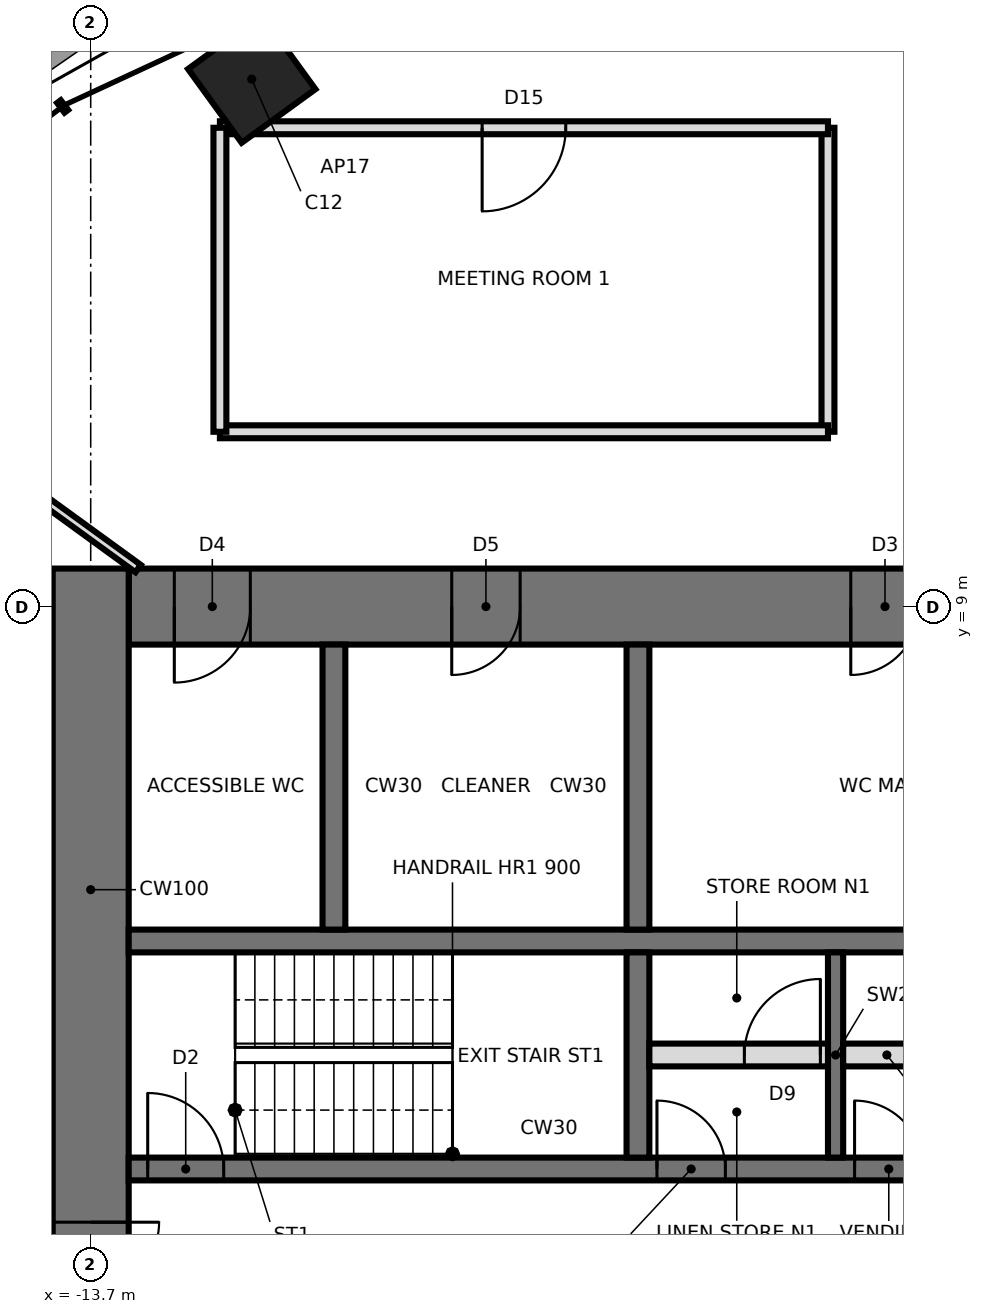
"""IFC4 building model, lengths in metres.
Left out: names, types, materials, properties, quantities, classifications, styles, units other than length and angle.
Written with IfcOpenShell. Run it as: python <this file> out.ifc"""

import sys

from ifc_helpers import new_model, si_unit, direction, frame, frame_2d, origin, origin_2d, place, context, subcontext, project, spatial, rectangle, extrude, element, fill, save


model = new_model("IFC4")
c1 = context("Model", 3, precision=1e-05, world=origin(), true_north=direction((0.0, 1.0)))
c2 = subcontext(c1, "Body", "Model", "MODEL_VIEW")
j1 = project(units=[si_unit("LENGTHUNIT", "METRE"), si_unit("PLANEANGLEUNIT", "RADIAN")], contexts=[c1])
p1 = place(None, origin())
s1 = spatial("IfcSite", under=j1, at=p1, CompositionType="ELEMENT")
p2 = place(p1, origin())
s2 = spatial("IfcBuilding", under=s1, at=p2, CompositionType="ELEMENT")
p3 = place(p2, frame((0.0, 0.0, 268.6)))
s3 = spatial("IfcBuildingStorey", under=s2, at=p3, CompositionType="ELEMENT", Elevation=268.6)
p4 = place(p3, frame((-11.581, 15.94, 0.0), z_axis=(0.0, 0.0, 1.0), x_axis=(-0.587785252292, 0.809016994375, 0.0)))
e1 = element("IfcColumn", 1, at=p4, inside=s3, PredefinedType="COLUMN", context=c2, shape_type="SweptSolid", body=[
    extrude(rectangle(XDim=1.2, YDim=1.2, at=origin_2d()), origin(), (0.0, 0.0, 1.0), 4.2),
])
p5 = place(p3, frame((13.2, 9.0, 0.0), z_axis=(0.0, 0.0, 1.0), x_axis=(-1.0, 0.0, 0.0)))
e2 = element("IfcWall", 2, at=p5, inside=s3, PredefinedType="SHEAR", context=c2, shape_type="SweptSolid", body=[
    extrude(rectangle(XDim=26.4, YDim=1.0, at=frame_2d((13.2, 0.0))), origin(), (0.0, 0.0, 1.0), 4.2),
])
p6 = place(p5, frame((2.65, 0.0, 0.0)))
e3 = element("IfcOpeningElement", 3, at=p6, cuts=e2, PredefinedType="OPENING", context=c2, shape_type="SweptSolid", body=[
    extrude(rectangle(XDim=0.9, YDim=2.1, at=frame_2d((0.45, 1.05))), frame((0.0, 0.51, 0.0), z_axis=(0.0, -1.0, 0.0), x_axis=(1.0, 0.0, 0.0)), (0.0, 0.0, 1.0), 1.02),
])
p7 = place(p5, frame((9.5, 0.0, 0.0)))
e4 = element("IfcOpeningElement", 4, at=p7, cuts=e2, PredefinedType="OPENING", context=c2, shape_type="SweptSolid", body=[
    extrude(rectangle(XDim=0.9, YDim=2.1, at=frame_2d((0.45, 1.05))), frame((0.0, 0.51, 0.0), z_axis=(0.0, -1.0, 0.0), x_axis=(1.0, 0.0, 0.0)), (0.0, 0.0, 1.0), 1.02),
])
p8 = place(p5, frame((16.0, 0.0, 0.0)))
e5 = element("IfcOpeningElement", 5, at=p8, cuts=e2, PredefinedType="OPENING", context=c2, shape_type="SweptSolid", body=[
    extrude(rectangle(XDim=0.9, YDim=2.1, at=frame_2d((0.45, 1.05))), frame((0.0, 0.51, 0.0), z_axis=(0.0, -1.0, 0.0), x_axis=(1.0, 0.0, 0.0)), (0.0, 0.0, 1.0), 1.02),
])
p9 = place(p5, frame((21.25, 0.0, 0.0)))
e6 = element("IfcOpeningElement", 6, at=p9, cuts=e2, PredefinedType="OPENING", context=c2, shape_type="SweptSolid", body=[
    extrude(rectangle(XDim=0.9, YDim=2.1, at=frame_2d((0.45, 1.05))), frame((0.0, 0.51, 0.0), z_axis=(0.0, -1.0, 0.0), x_axis=(1.0, 0.0, 0.0)), (0.0, 0.0, 1.0), 1.02),
])
p10 = place(p5, frame((24.8, 0.0, 0.0)))
e7 = element("IfcOpeningElement", 7, at=p10, cuts=e2, PredefinedType="OPENING", context=c2, shape_type="SweptSolid", body=[
    extrude(rectangle(XDim=1.0, YDim=2.1, at=frame_2d((0.5, 1.05))), frame((0.0, 0.51, 0.0), z_axis=(0.0, -1.0, 0.0), x_axis=(1.0, 0.0, 0.0)), (0.0, 0.0, 1.0), 1.02),
])
p11 = place(p3, frame((-13.7, 9.5, 0.0), z_axis=(0.0, 0.0, 1.0), x_axis=(0.0, -1.0, 0.0)))
e8 = element("IfcWall", 8, at=p11, inside=s3, PredefinedType="SHEAR", context=c2, shape_type="SweptSolid", body=[
    extrude(rectangle(XDim=19.0, YDim=1.0, at=frame_2d((9.5, 0.0))), origin(), (0.0, 0.0, 1.0), 4.2),
])
p12 = place(p11, frame((8.6, 0.0, 0.0)))
e9 = element("IfcOpeningElement", 9, at=p12, cuts=e8, PredefinedType="OPENING", context=c2, shape_type="SweptSolid", body=[
    extrude(rectangle(XDim=1.8, YDim=2.4, at=frame_2d((0.9, 1.2))), frame((0.0, 0.51, 0.0), z_axis=(0.0, -1.0, 0.0), x_axis=(1.0, 0.0, 0.0)), (0.0, 0.0, 1.0), 1.02),
])
p13 = place(p3, frame((-13.2, 1.6, 0.0), z_axis=(0.0, 0.0, 1.0), x_axis=(1.0, 0.0, 0.0)))
e10 = element("IfcWall", 10, at=p13, inside=s3, PredefinedType="SHEAR", context=c2, shape_type="SweptSolid", body=[
    extrude(rectangle(XDim=26.4, YDim=0.3, at=frame_2d((13.2, 0.0))), origin(), (0.0, 0.0, 1.0), 4.2),
])
p14 = place(p13, frame((0.25, 0.0, 0.0)))
e11 = element("IfcOpeningElement", 11, at=p14, cuts=e10, PredefinedType="OPENING", context=c2, shape_type="SweptSolid", body=[
    extrude(rectangle(XDim=1.0, YDim=2.1, at=frame_2d((0.5, 1.05))), frame((0.0, 0.16, 0.0), z_axis=(0.0, -1.0, 0.0), x_axis=(1.0, 0.0, 0.0)), (0.0, 0.0, 1.0), 0.32),
])
p15 = place(p13, frame((20.25, 0.0, 0.0)))
e12 = element("IfcOpeningElement", 12, at=p15, cuts=e10, PredefinedType="OPENING", context=c2, shape_type="SweptSolid", body=[
    extrude(rectangle(XDim=1.5, YDim=2.4, at=frame_2d((0.75, 1.2))), frame((0.0, 0.16, 0.0), z_axis=(0.0, -1.0, 0.0), x_axis=(1.0, 0.0, 0.0)), (0.0, 0.0, 1.0), 0.32),
])
p16 = place(p13, frame((6.95, 0.0, 0.0)))
e13 = element("IfcOpeningElement", 13, at=p16, cuts=e10, PredefinedType="OPENING", context=c2, shape_type="SweptSolid", body=[
    extrude(rectangle(XDim=0.9, YDim=2.1, at=frame_2d((0.45, 1.05))), frame((0.0, 0.16, 0.0), z_axis=(0.0, -1.0, 0.0), x_axis=(1.0, 0.0, 0.0)), (0.0, 0.0, 1.0), 0.32),
])
p17 = place(p13, frame((9.55, 0.0, 0.0)))
e14 = element("IfcOpeningElement", 14, at=p17, cuts=e10, PredefinedType="OPENING", context=c2, shape_type="SweptSolid", body=[
    extrude(rectangle(XDim=0.9, YDim=2.1, at=frame_2d((0.45, 1.05))), frame((0.0, 0.16, 0.0), z_axis=(0.0, -1.0, 0.0), x_axis=(1.0, 0.0, 0.0)), (0.0, 0.0, 1.0), 0.32),
])
p18 = place(p13, frame((12.15, 0.0, 0.0)))
e15 = element("IfcOpeningElement", 15, at=p18, cuts=e10, PredefinedType="OPENING", context=c2, shape_type="SweptSolid", body=[
    extrude(rectangle(XDim=0.9, YDim=2.1, at=frame_2d((0.45, 1.05))), frame((0.0, 0.16, 0.0), z_axis=(0.0, -1.0, 0.0), x_axis=(1.0, 0.0, 0.0)), (0.0, 0.0, 1.0), 0.32),
])
p19 = place(p13, frame((15.25, 0.0, 0.0)))
e16 = element("IfcOpeningElement", 16, at=p19, cuts=e10, PredefinedType="OPENING", context=c2, shape_type="SweptSolid", body=[
    extrude(rectangle(XDim=1.1, YDim=2.3, at=frame_2d((0.55, 1.15))), frame((0.0, 0.16, 0.0), z_axis=(0.0, -1.0, 0.0), x_axis=(1.0, 0.0, 0.0)), (0.0, 0.0, 1.0), 0.32),
])
p20 = place(p13, frame((17.85, 0.0, 0.0)))
e17 = element("IfcOpeningElement", 17, at=p20, cuts=e10, PredefinedType="OPENING", context=c2, shape_type="SweptSolid", body=[
    extrude(rectangle(XDim=1.1, YDim=2.3, at=frame_2d((0.55, 1.15))), frame((0.0, 0.16, 0.0), z_axis=(0.0, -1.0, 0.0), x_axis=(1.0, 0.0, 0.0)), (0.0, 0.0, 1.0), 0.32),
])
p21 = place(p13, frame((24.15, 0.0, 0.0)))
e18 = element("IfcOpeningElement", 18, at=p21, cuts=e10, PredefinedType="OPENING", context=c2, shape_type="SweptSolid", body=[
    extrude(rectangle(XDim=0.9, YDim=2.1, at=frame_2d((0.45, 1.05))), frame((0.0, 0.16, 0.0), z_axis=(0.0, -1.0, 0.0), x_axis=(1.0, 0.0, 0.0)), (0.0, 0.0, 1.0), 0.32),
])
p22 = place(p3, frame((-13.2, 4.6, 0.0), z_axis=(0.0, 0.0, 1.0), x_axis=(1.0, 0.0, 0.0)))
e19 = element("IfcWall", 19, at=p22, inside=s3, PredefinedType="SHEAR", context=c2, shape_type="SweptSolid", body=[
    extrude(rectangle(XDim=26.4, YDim=0.3, at=frame_2d((13.2, 0.0))), origin(), (0.0, 0.0, 1.0), 4.2),
])
p23 = place(p3, frame((-6.5, 1.75, 0.0), z_axis=(0.0, 0.0, 1.0), x_axis=(0.0, 1.0, 0.0)))
e20 = element("IfcWall", 20, at=p23, inside=s3, PredefinedType="SHEAR", context=c2, shape_type="SweptSolid", body=[
    extrude(rectangle(XDim=2.7, YDim=0.3, at=frame_2d((1.35, 0.0))), origin(), (0.0, 0.0, 1.0), 4.2),
])
p24 = place(p3, frame((-6.5, 4.75, 0.0), z_axis=(0.0, 0.0, 1.0), x_axis=(0.0, 1.0, 0.0)))
e21 = element("IfcWall", 21, at=p24, inside=s3, PredefinedType="SHEAR", context=c2, shape_type="SweptSolid", body=[
    extrude(rectangle(XDim=3.75, YDim=0.3, at=frame_2d((1.875, 0.0))), origin(), (0.0, 0.0, 1.0), 4.2),
])
p25 = place(p3, frame((-3.9, 1.75, 0.0), z_axis=(0.0, 0.0, 1.0), x_axis=(0.0, 1.0, 0.0)))
e22 = element("IfcWall", 22, at=p25, inside=s3, PredefinedType="SHEAR", context=c2, shape_type="SweptSolid", body=[
    extrude(rectangle(XDim=2.7, YDim=0.2, at=frame_2d((1.35, 0.0))), origin(), (0.0, 0.0, 1.0), 4.2),
])
p26 = place(p3, frame((-10.5, 4.75, 0.0), z_axis=(0.0, 0.0, 1.0), x_axis=(0.0, 1.0, 0.0)))
e23 = element("IfcWall", 23, at=p26, inside=s3, PredefinedType="SHEAR", context=c2, shape_type="SweptSolid", body=[
    extrude(rectangle(XDim=3.75, YDim=0.3, at=frame_2d((1.875, 0.0))), origin(), (0.0, 0.0, 1.0), 4.2),
])
p27 = place(p3, frame((-6.35, 3.1, 0.0), z_axis=(0.0, 0.0, 1.0), x_axis=(1.0, 0.0, 0.0)))
e24 = element("IfcWall", 24, at=p27, inside=s3, PredefinedType="PARTITIONING", context=c2, shape_type="SweptSolid", body=[
    extrude(rectangle(XDim=2.35, YDim=0.3, at=frame_2d((1.175, 0.0))), origin(), (0.0, 0.0, 1.0), 4.04),
])
p28 = place(p27, frame((1.25, 0.0, 0.0)))
e25 = element("IfcOpeningElement", 25, at=p28, cuts=e24, PredefinedType="OPENING", context=c2, shape_type="SweptSolid", body=[
    extrude(rectangle(XDim=1.0, YDim=2.4, at=frame_2d((0.5, 1.2))), frame((0.0, 0.16, 0.0), z_axis=(0.0, -1.0, 0.0), x_axis=(1.0, 0.0, 0.0)), (0.0, 0.0, 1.0), 0.32),
])
p29 = place(p3, frame((-3.8, 3.1, 0.0), z_axis=(0.0, 0.0, 1.0), x_axis=(1.0, 0.0, 0.0)))
e26 = element("IfcWall", 26, at=p29, inside=s3, PredefinedType="PARTITIONING", context=c2, shape_type="SweptSolid", body=[
    extrude(rectangle(XDim=2.4, YDim=0.3, at=frame_2d((1.2, 0.0))), origin(), (0.0, 0.0, 1.0), 4.04),
])
p30 = place(p29, frame((1.3, 0.0, 0.0)))
e27 = element("IfcOpeningElement", 27, at=p30, cuts=e26, PredefinedType="OPENING", context=c2, shape_type="SweptSolid", body=[
    extrude(rectangle(XDim=1.0, YDim=2.4, at=frame_2d((0.5, 1.2))), frame((0.0, 0.16, 0.0), z_axis=(0.0, -1.0, 0.0), x_axis=(1.0, 0.0, 0.0)), (0.0, 0.0, 1.0), 0.32),
])
p31 = place(p3, frame((-4.0, 15.3, 0.0), z_axis=(0.0, 0.0, 1.0), x_axis=(0.0, -1.0, 0.0)))
e28 = element("IfcWall", 28, at=p31, inside=s3, PredefinedType="PARTITIONING", context=c2, shape_type="SweptSolid", body=[
    extrude(rectangle(XDim=4.0, YDim=0.17, at=frame_2d((2.0, 0.0))), origin(), (0.0, 0.0, 1.0), 4.04),
])
p32 = place(p3, frame((-12.0, 15.3, 0.0), z_axis=(0.0, 0.0, 1.0), x_axis=(1.0, 0.0, 0.0)))
e29 = element("IfcWall", 29, at=p32, inside=s3, PredefinedType="PARTITIONING", context=c2, shape_type="SweptSolid", body=[
    extrude(rectangle(XDim=8.0, YDim=0.17, at=frame_2d((4.0, 0.0))), origin(), (0.0, 0.0, 1.0), 4.04),
])
p33 = place(p32, frame((3.45, 0.0, 0.0)))
e30 = element("IfcOpeningElement", 30, at=p33, cuts=e29, PredefinedType="OPENING", context=c2, shape_type="SweptSolid", body=[
    extrude(rectangle(XDim=1.1, YDim=2.4, at=frame_2d((0.55, 1.2))), frame((0.0, 0.095, 0.0), z_axis=(0.0, -1.0, 0.0), x_axis=(1.0, 0.0, 0.0)), (0.0, 0.0, 1.0), 0.19),
])
p34 = place(p3, frame((-4.0, 11.3, 0.0), z_axis=(0.0, 0.0, 1.0), x_axis=(-1.0, 0.0, 0.0)))
e31 = element("IfcWall", 31, at=p34, inside=s3, PredefinedType="PARTITIONING", context=c2, shape_type="SweptSolid", body=[
    extrude(rectangle(XDim=8.0, YDim=0.17, at=frame_2d((4.0, 0.0))), origin(), (0.0, 0.0, 1.0), 4.04),
])
p35 = place(p3, frame((-12.0, 11.3, 0.0), z_axis=(0.0, 0.0, 1.0), x_axis=(0.0, 1.0, 0.0)))
e32 = element("IfcWall", 32, at=p35, inside=s3, PredefinedType="PARTITIONING", context=c2, shape_type="SweptSolid", body=[
    extrude(rectangle(XDim=4.0, YDim=0.17, at=frame_2d((2.0, 0.0))), origin(), (0.0, 0.0, 1.0), 4.04),
])
p36 = place(p3, frame((-13.076, 9.5, 0.0), z_axis=(0.0, 0.0, 1.0), x_axis=(-0.809011091578, 0.58779337671, 0.0)))
e33 = element("IfcWall", 33, at=p36, inside=s3, PredefinedType="PARTITIONING", context=c2, shape_type="SweptSolid", body=[
    extrude(rectangle(XDim=5.603, YDim=0.12, at=frame_2d((2.802, 0.0))), origin(), (0.0, 0.0, 1.0), 3.24),
])
p37 = place(p12, origin())
e34 = element("IfcDoor", 34, at=p37, inside=s3, OperationType="DOUBLE_DOOR_SINGLE_SWING", PredefinedType="DOOR", context=c2, shape_type="SweptSolid", body=[
    extrude(rectangle(XDim=1.72, YDim=2.36, at=frame_2d((0.9, 1.18))), frame((0.0, 0.025, 0.0), z_axis=(0.0, -1.0, 0.0), x_axis=(1.0, 0.0, 0.0)), (0.0, 0.0, 1.0), 0.05),
    extrude(rectangle(XDim=0.04, YDim=2.4, at=frame_2d((0.02, 1.2))), frame((0.0, 0.25, 0.0), z_axis=(0.0, -1.0, 0.0), x_axis=(1.0, 0.0, 0.0)), (0.0, 0.0, 1.0), 0.5),
    extrude(rectangle(XDim=0.04, YDim=2.4, at=frame_2d((1.78, 1.2))), frame((0.0, 0.25, 0.0), z_axis=(0.0, -1.0, 0.0), x_axis=(1.0, 0.0, 0.0)), (0.0, 0.0, 1.0), 0.5),
    extrude(rectangle(XDim=1.72, YDim=0.04, at=frame_2d((0.9, 2.38))), frame((0.0, 0.25, 0.0), z_axis=(0.0, -1.0, 0.0), x_axis=(1.0, 0.0, 0.0)), (0.0, 0.0, 1.0), 0.5),
])
fill(e9, e34)
p38 = place(p14, origin())
e35 = element("IfcDoor", 35, at=p38, inside=s3, OperationType="SINGLE_SWING_LEFT", PredefinedType="DOOR", context=c2, shape_type="SweptSolid", body=[
    extrude(rectangle(XDim=1.0, YDim=2.1, at=frame_2d((0.5, 1.05))), frame((0.0, 0.025, 0.0), z_axis=(0.0, -1.0, 0.0), x_axis=(1.0, 0.0, 0.0)), (0.0, 0.0, 1.0), 0.05),
])
fill(e11, e35)
p39 = place(p28, origin())
e36 = element("IfcDoor", 36, at=p39, inside=s3, OperationType="SINGLE_SWING_RIGHT", PredefinedType="DOOR", context=c2, shape_type="SweptSolid", body=[
    extrude(rectangle(XDim=1.0, YDim=2.4, at=frame_2d((0.5, 1.2))), frame((0.0, 0.025, 0.0), z_axis=(0.0, -1.0, 0.0), x_axis=(1.0, 0.0, 0.0)), (0.0, 0.0, 1.0), 0.05),
])
fill(e25, e36)
p40 = place(p16, origin())
e37 = element("IfcDoor", 37, at=p40, inside=s3, OperationType="SINGLE_SWING_LEFT", PredefinedType="DOOR", context=c2, shape_type="SweptSolid", body=[
    extrude(rectangle(XDim=0.9, YDim=2.1, at=frame_2d((0.45, 1.05))), frame((0.0, 0.025, 0.0), z_axis=(0.0, -1.0, 0.0), x_axis=(1.0, 0.0, 0.0)), (0.0, 0.0, 1.0), 0.05),
])
fill(e13, e37)
p41 = place(p17, origin())
e38 = element("IfcDoor", 38, at=p41, inside=s3, OperationType="SINGLE_SWING_LEFT", PredefinedType="DOOR", context=c2, shape_type="SweptSolid", body=[
    extrude(rectangle(XDim=0.9, YDim=2.1, at=frame_2d((0.45, 1.05))), frame((0.0, 0.025, 0.0), z_axis=(0.0, -1.0, 0.0), x_axis=(1.0, 0.0, 0.0)), (0.0, 0.0, 1.0), 0.05),
])
fill(e14, e38)
p42 = place(p8, origin())
e39 = element("IfcDoor", 39, at=p42, inside=s3, OperationType="SINGLE_SWING_RIGHT", PredefinedType="DOOR", context=c2, shape_type="SweptSolid", body=[
    extrude(rectangle(XDim=0.82, YDim=2.06, at=frame_2d((0.45, 1.03))), frame((0.0, 0.025, 0.0), z_axis=(0.0, -1.0, 0.0), x_axis=(1.0, 0.0, 0.0)), (0.0, 0.0, 1.0), 0.05),
    extrude(rectangle(XDim=0.04, YDim=2.1, at=frame_2d((0.02, 1.05))), frame((0.0, 0.25, 0.0), z_axis=(0.0, -1.0, 0.0), x_axis=(1.0, 0.0, 0.0)), (0.0, 0.0, 1.0), 0.5),
    extrude(rectangle(XDim=0.04, YDim=2.1, at=frame_2d((0.88, 1.05))), frame((0.0, 0.25, 0.0), z_axis=(0.0, -1.0, 0.0), x_axis=(1.0, 0.0, 0.0)), (0.0, 0.0, 1.0), 0.5),
    extrude(rectangle(XDim=0.82, YDim=0.04, at=frame_2d((0.45, 2.08))), frame((0.0, 0.25, 0.0), z_axis=(0.0, -1.0, 0.0), x_axis=(1.0, 0.0, 0.0)), (0.0, 0.0, 1.0), 0.5),
])
fill(e5, e39)
p43 = place(p9, origin())
e40 = element("IfcDoor", 40, at=p43, inside=s3, OperationType="SINGLE_SWING_RIGHT", PredefinedType="DOOR", context=c2, shape_type="SweptSolid", body=[
    extrude(rectangle(XDim=0.82, YDim=2.06, at=frame_2d((0.45, 1.03))), frame((0.0, 0.025, 0.0), z_axis=(0.0, -1.0, 0.0), x_axis=(1.0, 0.0, 0.0)), (0.0, 0.0, 1.0), 0.05),
    extrude(rectangle(XDim=0.04, YDim=2.1, at=frame_2d((0.02, 1.05))), frame((0.0, 0.25, 0.0), z_axis=(0.0, -1.0, 0.0), x_axis=(1.0, 0.0, 0.0)), (0.0, 0.0, 1.0), 0.5),
    extrude(rectangle(XDim=0.04, YDim=2.1, at=frame_2d((0.88, 1.05))), frame((0.0, 0.25, 0.0), z_axis=(0.0, -1.0, 0.0), x_axis=(1.0, 0.0, 0.0)), (0.0, 0.0, 1.0), 0.5),
    extrude(rectangle(XDim=0.82, YDim=0.04, at=frame_2d((0.45, 2.08))), frame((0.0, 0.25, 0.0), z_axis=(0.0, -1.0, 0.0), x_axis=(1.0, 0.0, 0.0)), (0.0, 0.0, 1.0), 0.5),
])
fill(e6, e40)
p44 = place(p10, origin())
e41 = element("IfcDoor", 41, at=p44, inside=s3, OperationType="SINGLE_SWING_RIGHT", PredefinedType="DOOR", context=c2, shape_type="SweptSolid", body=[
    extrude(rectangle(XDim=0.92, YDim=2.06, at=frame_2d((0.5, 1.03))), frame((0.0, 0.025, 0.0), z_axis=(0.0, -1.0, 0.0), x_axis=(1.0, 0.0, 0.0)), (0.0, 0.0, 1.0), 0.05),
    extrude(rectangle(XDim=0.04, YDim=2.1, at=frame_2d((0.02, 1.05))), frame((0.0, 0.25, 0.0), z_axis=(0.0, -1.0, 0.0), x_axis=(1.0, 0.0, 0.0)), (0.0, 0.0, 1.0), 0.5),
    extrude(rectangle(XDim=0.04, YDim=2.1, at=frame_2d((0.98, 1.05))), frame((0.0, 0.25, 0.0), z_axis=(0.0, -1.0, 0.0), x_axis=(1.0, 0.0, 0.0)), (0.0, 0.0, 1.0), 0.5),
    extrude(rectangle(XDim=0.92, YDim=0.04, at=frame_2d((0.5, 2.08))), frame((0.0, 0.25, 0.0), z_axis=(0.0, -1.0, 0.0), x_axis=(1.0, 0.0, 0.0)), (0.0, 0.0, 1.0), 0.5),
])
fill(e7, e41)
p45 = place(p33, frame((1.1, 0.0, 0.0), z_axis=(0.0, 0.0, 1.0), x_axis=(-1.0, 0.0, 0.0)))
e42 = element("IfcDoor", 42, at=p45, inside=s3, OperationType="SINGLE_SWING_RIGHT", PredefinedType="DOOR", context=c2, shape_type="SweptSolid", body=[
    extrude(rectangle(XDim=1.1, YDim=2.4, at=frame_2d((0.55, 1.2))), frame((0.0, 0.025, 0.0), z_axis=(0.0, -1.0, 0.0), x_axis=(1.0, 0.0, 0.0)), (0.0, 0.0, 1.0), 0.05),
])
fill(e30, e42)
save(model, sys.argv[1])
